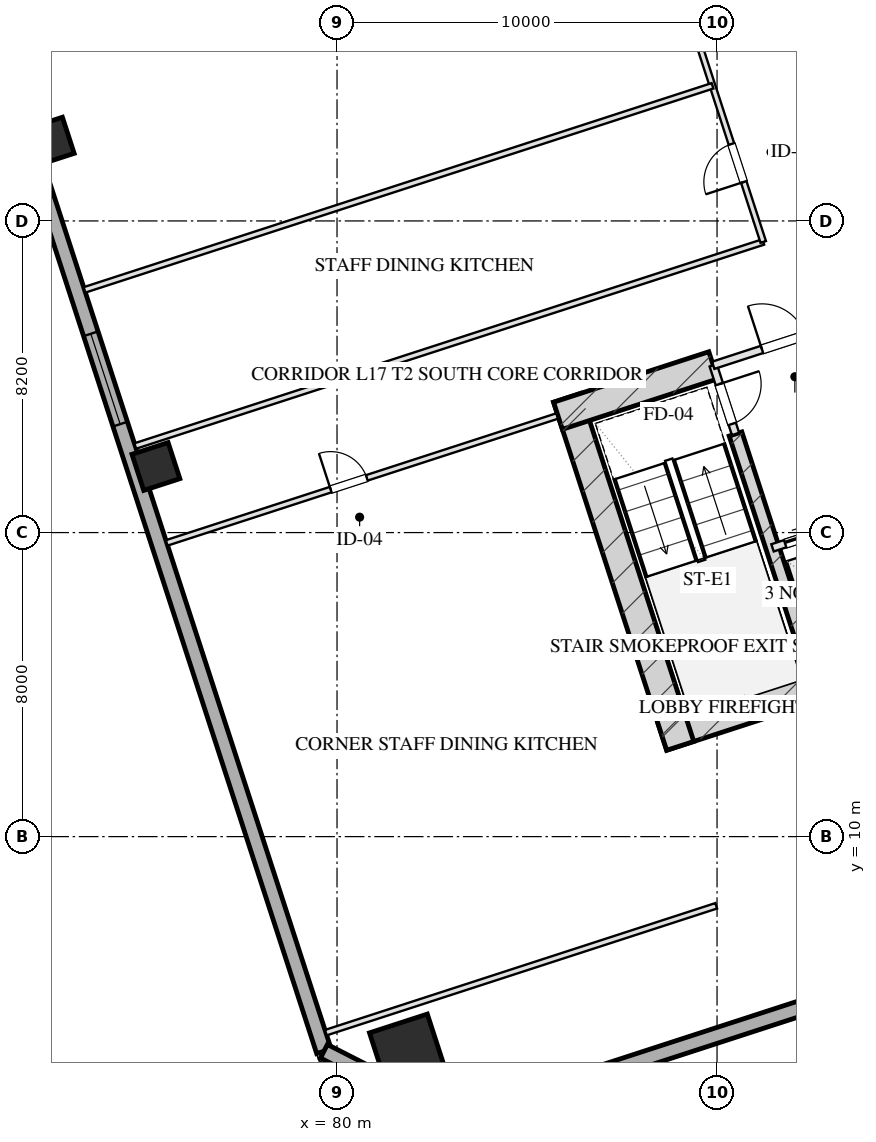
"""IFC4 building model, lengths in metres.
Left out: names, types, materials, properties, quantities, classifications, styles, units other than length and angle.
Written with IfcOpenShell. Run it as: python <this file> out.ifc"""

import sys

from ifc_helpers import new_model, si_unit, direction, frame, frame_2d, origin, origin_2d, place, context, subcontext, project, spatial, rectangle, hollow_rectangle, extrude, element, fill, save


model = new_model("IFC4")
c1 = context("Model", 3, precision=1e-05, world=origin(), true_north=direction((0.0, 1.0)))
c2 = subcontext(c1, "Body", "Model", "MODEL_VIEW")
j1 = project(units=[si_unit("LENGTHUNIT", "METRE"), si_unit("PLANEANGLEUNIT", "RADIAN")], contexts=[c1])
p1 = place(None, origin())
s1 = spatial("IfcSite", under=j1, at=p1, CompositionType="ELEMENT")
p2 = place(p1, origin())
s2 = spatial("IfcBuilding", under=s1, at=p2, CompositionType="ELEMENT")
p3 = place(p2, frame((0.0, 0.0, 71.3)))
s3 = spatial("IfcBuildingStorey", under=s2, at=p3, CompositionType="ELEMENT", Elevation=71.3)
p4 = place(p3, frame((88.559, 12.629, 0.0), z_axis=(0.0, 0.0, 1.0), x_axis=(0.951056072937, 0.309018358888, 0.0)))
e1 = element("IfcWall", 1, at=p4, inside=s3, PredefinedType="SHEAR", context=c2, shape_type="SweptSolid", body=[
    extrude(rectangle(XDim=16.55, YDim=0.75, at=frame_2d((8.275, 0.0))), origin(), (0.0, 0.0, 1.0), 3.45),
])
p5 = place(p3, frame((86.055, 21.546, 0.0), z_axis=(0.0, 0.0, 1.0), x_axis=(0.309023585745, -0.951054374604, 0.0)))
e2 = element("IfcWall", 2, at=p5, inside=s3, PredefinedType="SHEAR", context=c2, shape_type="SweptSolid", body=[
    extrude(rectangle(XDim=9.63, YDim=0.75, at=frame_2d((4.815, 0.0))), origin(), (0.0, 0.0, 1.0), 3.45),
])
p6 = place(p3, frame((90.486, 20.594, 0.0), z_axis=(0.0, 0.0, 1.0), x_axis=(0.309020428229, -0.951055400562, 0.0)))
e3 = element("IfcWall", 3, at=p6, inside=s3, PredefinedType="SHEAR", context=c2, shape_type="SweptSolid", body=[
    extrude(rectangle(XDim=6.98, YDim=0.35, at=frame_2d((3.49, 0.0))), origin(), (0.0, 0.0, 1.0), 3.45),
])
p7 = place(p3, frame((85.814, 21.074, 0.0), z_axis=(0.0, 0.0, 1.0), x_axis=(0.95106580992, 0.308988390074, 0.0)))
e4 = element("IfcWall", 4, at=p7, inside=s3, PredefinedType="SHEAR", context=c2, shape_type="SweptSolid", body=[
    extrude(rectangle(XDim=4.295, YDim=0.75, at=frame_2d((2.147, 0.0))), origin(), (0.0, 0.0, 1.0), 3.45),
])
p8 = place(p3, frame((81.863, 4.323, 0.0), z_axis=(0.0, 0.0, 1.0), x_axis=(0.951056516295, 0.309016994375, 0.0)))
e5 = element("IfcColumn", 5, at=p8, inside=s3, PredefinedType="COLUMN", context=c2, shape_type="SweptSolid", body=[
    extrude(hollow_rectangle(XDim=1.6, YDim=1.6, WallThickness=0.055, at=origin_2d()), origin(), (0.0, 0.0, 1.0), 3.451),
])
for number, where, z_axis, x_axis in (
    (6, (75.234, 19.739, 0.0), (0.0, 0.0, 1.0), (0.951, 0.309, 0.0)),
    (7, (72.453, 28.299, 0.0), (0.0, 0.0, 1.0), (0.951, 0.309, 0.0)),
):
    element("IfcColumn", number, at=place(p3, frame(where, z_axis=z_axis, x_axis=x_axis)), inside=s3, PredefinedType="COLUMN", context=c2, shape_type="SweptSolid", body=[
        extrude(hollow_rectangle(XDim=1.0, YDim=1.0, WallThickness=0.036, at=origin_2d()), origin(), (0.0, 0.0, 1.0), 3.451),
    ])
p9 = place(p3, frame((79.655, 4.352, 0.0), z_axis=(0.0, 0.0, 1.0), x_axis=(-0.309014526607, 0.951057318118, 0.0)))
e8 = element("IfcWall", 8, at=p9, inside=s3, PredefinedType="SOLIDWALL", context=c2, shape_type="SweptSolid", body=[
    extrude(rectangle(XDim=50.0, YDim=0.4, at=frame_2d((25.0, 0.0))), origin(), (0.0, 0.0, 1.0), 2.61),
])
p10 = place(p9, frame((17.35, 0.0, 0.75)))
e9 = element("IfcOpeningElement", 9, at=p10, cuts=e8, PredefinedType="OPENING", context=c2, shape_type="SweptSolid", body=[
    extrude(rectangle(XDim=2.5, YDim=1.46, at=frame_2d((1.25, 0.73))), frame((0.0, 0.21, 0.0), z_axis=(0.0, -1.0, 0.0), x_axis=(1.0, 0.0, 0.0)), (0.0, 0.0, 1.0), 0.42),
])
p11 = place(p9, frame((30.25, 0.0, 0.0)))
e10 = element("IfcOpeningElement", 10, at=p11, cuts=e8, PredefinedType="OPENING", context=c2, shape_type="SweptSolid", body=[
    extrude(rectangle(XDim=1.1, YDim=2.15, at=frame_2d((0.55, 1.075))), frame((0.0, 0.21, 0.0), z_axis=(0.0, -1.0, 0.0), x_axis=(1.0, 0.0, 0.0)), (0.0, 0.0, 1.0), 0.42),
])
p12 = place(p3, frame((113.998, 12.567, 0.0), z_axis=(0.0, 0.0, 1.0), x_axis=(-0.951055939317, -0.309018770125, 0.0)))
e11 = element("IfcWall", 11, at=p12, inside=s3, PredefinedType="SOLIDWALL", context=c2, shape_type="SweptSolid", body=[
    extrude(rectangle(XDim=32.4, YDim=0.4, at=frame_2d((16.2, 0.0))), origin(), (0.0, 0.0, 1.0), 2.61),
])
p13 = place(p3, frame((83.184, 2.554, 0.0), z_axis=(0.0, 0.0, 1.0), x_axis=(-0.890998089617, 0.454007053137, 0.0)))
e12 = element("IfcWall", 12, at=p13, inside=s3, PredefinedType="SOLIDWALL", context=c2, shape_type="SweptSolid", body=[
    extrude(rectangle(XDim=3.96, YDim=0.4, at=frame_2d((1.98, 0.0))), origin(), (0.0, 0.0, 1.0), 2.61),
])
p14 = place(p3, frame((89.899, 22.401, 0.0), z_axis=(0.0, 0.0, 1.0), x_axis=(0.308932062672, -0.951084108086, 0.0)))
e13 = element("IfcWall", 13, at=p14, inside=s3, PredefinedType="PARTITIONING", context=c2, shape_type="SweptSolid", body=[
    extrude(rectangle(XDim=1.9, YDim=0.2, at=frame_2d((0.95, 0.0))), origin(), (0.0, 0.0, 1.0), 3.175),
])
p15 = place(p14, frame((0.52, 0.0, 0.0)))
e14 = element("IfcOpeningElement", 14, at=p15, cuts=e13, PredefinedType="OPENING", context=c2, shape_type="SweptSolid", body=[
    extrude(rectangle(XDim=1.1, YDim=2.05, at=frame_2d((0.55, 1.025))), frame((0.0, 0.11, 0.0), z_axis=(0.0, -1.0, 0.0), x_axis=(1.0, 0.0, 0.0)), (0.0, 0.0, 1.0), 0.22),
])
p16 = place(p3, frame((89.899, 22.401, 0.0), z_axis=(0.0, 0.0, 1.0), x_axis=(0.951046716504, 0.309047153403, 0.0)))
e15 = element("IfcWall", 15, at=p16, inside=s3, PredefinedType="PARTITIONING", context=c2, shape_type="SweptSolid", body=[
    extrude(rectangle(XDim=3.83, YDim=0.2, at=frame_2d((1.915, 0.0))), origin(), (0.0, 0.0, 1.0), 3.175),
])
p17 = place(p16, frame((1.35, 0.0, 0.0)))
e16 = element("IfcOpeningElement", 16, at=p17, cuts=e15, PredefinedType="OPENING", context=c2, shape_type="SweptSolid", body=[
    extrude(rectangle(XDim=1.2, YDim=2.05, at=frame_2d((0.6, 1.025))), frame((0.0, 0.11, 0.0), z_axis=(0.0, -1.0, 0.0), x_axis=(1.0, 0.0, 0.0)), (0.0, 0.0, 1.0), 0.22),
])
p18 = place(p3, frame((91.46, 17.598, 0.0), z_axis=(0.0, 0.0, 1.0), x_axis=(0.951062257173, 0.308999325213, 0.0)))
e17 = element("IfcWall", 17, at=p18, inside=s3, PredefinedType="PARTITIONING", context=c2, shape_type="SweptSolid", body=[
    extrude(rectangle(XDim=2.1, YDim=0.2, at=frame_2d((1.05, 0.0))), origin(), (0.0, 0.0, 1.0), 3.175),
])
p19 = place(p18, frame((0.35, 0.0, 0.0)))
e18 = element("IfcOpeningElement", 18, at=p19, cuts=e17, PredefinedType="OPENING", context=c2, shape_type="SweptSolid", body=[
    extrude(rectangle(XDim=1.1, YDim=2.05, at=frame_2d((0.55, 1.025))), frame((0.0, 0.11, 0.0), z_axis=(0.0, -1.0, 0.0), x_axis=(1.0, 0.0, 0.0)), (0.0, 0.0, 1.0), 0.22),
])
p20 = place(p3, frame((79.707, 4.842, 0.0), z_axis=(0.0, 0.0, 1.0), x_axis=(0.951056658866, 0.309016555588, 0.0)))
e19 = element("IfcWall", 19, at=p20, inside=s3, PredefinedType="PARTITIONING", context=c2, shape_type="SweptSolid", body=[
    extrude(rectangle(XDim=10.8, YDim=0.15, at=frame_2d((5.4, 0.0))), origin(), (0.0, 0.0, 1.0), 3.175),
])
p21 = place(p3, frame((75.519, 17.729, 0.0), z_axis=(0.0, 0.0, 1.0), x_axis=(0.951056658866, 0.309016555588, 0.0)))
e20 = element("IfcWall", 20, at=p21, inside=s3, PredefinedType="PARTITIONING", context=c2, shape_type="SweptSolid", body=[
    extrude(rectangle(XDim=10.8, YDim=0.15, at=frame_2d((5.4, 0.0))), origin(), (0.0, 0.0, 1.0), 3.175),
])
p22 = place(p21, frame((4.536, 0.0, 0.0)))
e21 = element("IfcOpeningElement", 21, at=p22, cuts=e20, PredefinedType="OPENING", context=c2, shape_type="SweptSolid", body=[
    extrude(rectangle(XDim=1.0, YDim=2.05, at=frame_2d((0.5, 1.025))), frame((0.0, 0.085, 0.0), z_axis=(0.0, -1.0, 0.0), x_axis=(1.0, 0.0, 0.0)), (0.0, 0.0, 1.0), 0.17),
])
p23 = place(p3, frame((74.691, 20.278, 0.0), z_axis=(0.0, 0.0, 1.0), x_axis=(0.951053169828, 0.309027293551, 0.0)))
e22 = element("IfcWall", 22, at=p23, inside=s3, PredefinedType="PARTITIONING", context=c2, shape_type="SweptSolid", body=[
    extrude(rectangle(XDim=17.375, YDim=0.15, at=frame_2d((8.688, 0.0))), origin(), (0.0, 0.0, 1.0), 3.175),
])
p24 = place(p3, frame((91.216, 25.647, 0.0), z_axis=(0.0, 0.0, 1.0), x_axis=(-0.309022042254, 0.951054876125, 0.0)))
e23 = element("IfcWall", 23, at=p24, inside=s3, PredefinedType="PARTITIONING", context=c2, shape_type="SweptSolid", body=[
    extrude(rectangle(XDim=16.64, YDim=0.15, at=frame_2d((8.32, 0.0))), origin(), (0.0, 0.0, 1.0), 3.175),
])
p25 = place(p24, frame((1.66, 0.0, 0.0)))
e24 = element("IfcOpeningElement", 24, at=p25, cuts=e23, PredefinedType="OPENING", context=c2, shape_type="SweptSolid", body=[
    extrude(rectangle(XDim=1.05, YDim=2.05, at=frame_2d((0.525, 1.025))), frame((0.0, 0.085, 0.0), z_axis=(0.0, -1.0, 0.0), x_axis=(1.0, 0.0, 0.0)), (0.0, 0.0, 1.0), 0.17),
])
p26 = place(p24, frame((7.82, 0.0, 0.0)))
e25 = element("IfcOpeningElement", 25, at=p26, cuts=e23, PredefinedType="OPENING", context=c2, shape_type="SweptSolid", body=[
    extrude(rectangle(XDim=1.0, YDim=2.05, at=frame_2d((0.5, 1.025))), frame((0.0, 0.085, 0.0), z_axis=(0.0, -1.0, 0.0), x_axis=(1.0, 0.0, 0.0)), (0.0, 0.0, 1.0), 0.17),
])
p27 = place(p24, frame((13.98, 0.0, 0.0)))
e26 = element("IfcOpeningElement", 26, at=p27, cuts=e23, PredefinedType="OPENING", context=c2, shape_type="SweptSolid", body=[
    extrude(rectangle(XDim=1.0, YDim=2.05, at=frame_2d((0.5, 1.025))), frame((0.0, 0.085, 0.0), z_axis=(0.0, -1.0, 0.0), x_axis=(1.0, 0.0, 0.0)), (0.0, 0.0, 1.0), 0.17),
])
p28 = place(p3, frame((95.638, 27.084, 0.0), z_axis=(0.0, 0.0, 1.0), x_axis=(-0.30901773025, 0.951056277195, 0.0)))
e27 = element("IfcWall", 27, at=p28, inside=s3, PredefinedType="PARTITIONING", context=c2, shape_type="SweptSolid", body=[
    extrude(rectangle(XDim=16.64, YDim=0.15, at=frame_2d((8.32, 0.0))), origin(), (0.0, 0.0, 1.0), 3.175),
])
p29 = place(p28, frame((1.655, 0.0, 0.0)))
e28 = element("IfcOpeningElement", 28, at=p29, cuts=e27, PredefinedType="OPENING", context=c2, shape_type="SweptSolid", body=[
    extrude(rectangle(XDim=1.0, YDim=2.05, at=frame_2d((0.5, 1.025))), frame((0.0, 0.085, 0.0), z_axis=(0.0, -1.0, 0.0), x_axis=(1.0, 0.0, 0.0)), (0.0, 0.0, 1.0), 0.17),
])
p30 = place(p28, frame((6.155, 0.0, 0.0)))
e29 = element("IfcOpeningElement", 29, at=p30, cuts=e27, PredefinedType="OPENING", context=c2, shape_type="SweptSolid", body=[
    extrude(rectangle(XDim=1.0, YDim=2.05, at=frame_2d((0.5, 1.025))), frame((0.0, 0.085, 0.0), z_axis=(0.0, -1.0, 0.0), x_axis=(1.0, 0.0, 0.0)), (0.0, 0.0, 1.0), 0.17),
])
p31 = place(p28, frame((10.565, 0.0, 0.0)))
e30 = element("IfcOpeningElement", 30, at=p31, cuts=e27, PredefinedType="OPENING", context=c2, shape_type="SweptSolid", body=[
    extrude(rectangle(XDim=1.0, YDim=2.05, at=frame_2d((0.5, 1.025))), frame((0.0, 0.085, 0.0), z_axis=(0.0, -1.0, 0.0), x_axis=(1.0, 0.0, 0.0)), (0.0, 0.0, 1.0), 0.17),
])
p32 = place(p28, frame((14.385, 0.0, 0.0)))
e31 = element("IfcOpeningElement", 31, at=p32, cuts=e27, PredefinedType="OPENING", context=c2, shape_type="SweptSolid", body=[
    extrude(rectangle(XDim=1.0, YDim=2.05, at=frame_2d((0.5, 1.025))), frame((0.0, 0.085, 0.0), z_axis=(0.0, -1.0, 0.0), x_axis=(1.0, 0.0, 0.0)), (0.0, 0.0, 1.0), 0.17),
])
p33 = place(p3, frame((73.356, 24.386, 0.0), z_axis=(0.0, 0.0, 1.0), x_axis=(0.951057299418, 0.309014584159, 0.0)))
e32 = element("IfcWall", 32, at=p33, inside=s3, PredefinedType="PARTITIONING", context=c2, shape_type="SweptSolid", body=[
    extrude(rectangle(XDim=17.375, YDim=0.15, at=frame_2d((8.688, 0.0))), origin(), (0.0, 0.0, 1.0), 3.175),
])
p34 = place(p10, origin())
e33 = element("IfcWindow", 33, at=p34, inside=s3, PartitioningType="TRIPLE_PANEL_VERTICAL", PredefinedType="WINDOW", context=c2, shape_type="SweptSolid", body=[
    extrude(rectangle(XDim=2.5, YDim=1.46, at=frame_2d((1.25, 0.73))), frame((0.0, 0.03, 0.0), z_axis=(0.0, -1.0, 0.0), x_axis=(1.0, 0.0, 0.0)), (0.0, 0.0, 1.0), 0.06),
])
fill(e9, e33)
p35 = place(p15, origin())
e34 = element("IfcDoor", 34, at=p35, inside=s3, OperationType="SINGLE_SWING_LEFT", PredefinedType="DOOR", context=c2, shape_type="SweptSolid", body=[
    extrude(rectangle(XDim=1.1, YDim=2.05, at=frame_2d((0.55, 1.025))), frame((0.0, 0.025, 0.0), z_axis=(0.0, -1.0, 0.0), x_axis=(1.0, 0.0, 0.0)), (0.0, 0.0, 1.0), 0.05),
])
fill(e14, e34)
p36 = place(p17, origin())
e35 = element("IfcDoor", 35, at=p36, inside=s3, OperationType="SINGLE_SWING_LEFT", PredefinedType="DOOR", context=c2, shape_type="SweptSolid", body=[
    extrude(rectangle(XDim=1.2, YDim=2.05, at=frame_2d((0.6, 1.025))), frame((0.0, 0.025, 0.0), z_axis=(0.0, -1.0, 0.0), x_axis=(1.0, 0.0, 0.0)), (0.0, 0.0, 1.0), 0.05),
])
fill(e16, e35)
p37 = place(p19, origin())
e36 = element("IfcDoor", 36, at=p37, inside=s3, OperationType="DOUBLE_DOOR_SLIDING", PredefinedType="DOOR", context=c2, shape_type="SweptSolid", body=[
    extrude(rectangle(XDim=1.1, YDim=2.05, at=frame_2d((0.55, 1.025))), frame((0.0, 0.025, 0.0), z_axis=(0.0, -1.0, 0.0), x_axis=(1.0, 0.0, 0.0)), (0.0, 0.0, 1.0), 0.05),
])
fill(e18, e36)
p38 = place(p22, origin())
e37 = element("IfcDoor", 37, at=p38, inside=s3, OperationType="SINGLE_SWING_LEFT", PredefinedType="DOOR", context=c2, shape_type="SweptSolid", body=[
    extrude(rectangle(XDim=1.0, YDim=2.05, at=frame_2d((0.5, 1.025))), frame((0.0, 0.025, 0.0), z_axis=(0.0, -1.0, 0.0), x_axis=(1.0, 0.0, 0.0)), (0.0, 0.0, 1.0), 0.05),
])
fill(e21, e37)
p39 = place(p25, origin())
e38 = element("IfcDoor", 38, at=p39, inside=s3, OperationType="SINGLE_SWING_LEFT", PredefinedType="DOOR", context=c2, shape_type="SweptSolid", body=[
    extrude(rectangle(XDim=1.05, YDim=2.05, at=frame_2d((0.525, 1.025))), frame((0.0, 0.025, 0.0), z_axis=(0.0, -1.0, 0.0), x_axis=(1.0, 0.0, 0.0)), (0.0, 0.0, 1.0), 0.05),
])
fill(e24, e38)
save(model, sys.argv[1])
